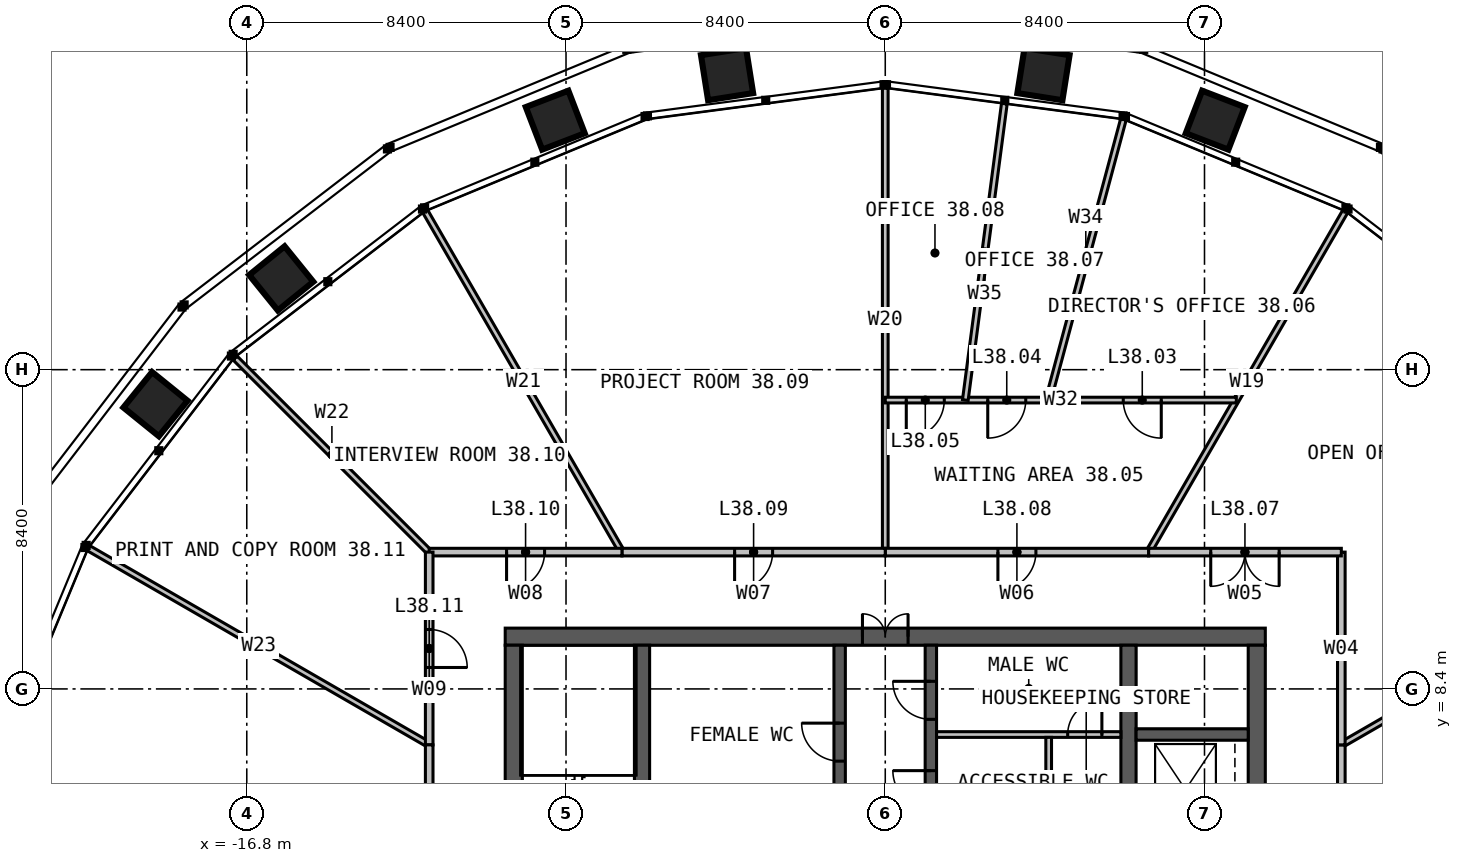
"""IFC4 building model, lengths in metres.
Left out: names, types, materials, properties, quantities, classifications, styles, units other than length and angle.
Written with IfcOpenShell. Run it as: python <this file> out.ifc"""

import sys

from ifc_helpers import new_model, si_unit, direction, frame, frame_2d, origin, place, context, subcontext, project, spatial, rectangle, extrude, element, fill, save


model = new_model("IFC4")
c1 = context("Model", 3, precision=1e-05, world=origin(), true_north=direction((0.0, 1.0)))
c2 = subcontext(c1, "Body", "Model", "MODEL_VIEW")
j1 = project(units=[si_unit("LENGTHUNIT", "METRE"), si_unit("PLANEANGLEUNIT", "RADIAN")], contexts=[c1])
p1 = place(None, origin())
s1 = spatial("IfcSite", under=j1, at=p1, CompositionType="ELEMENT")
p2 = place(p1, origin())
s2 = spatial("IfcBuilding", under=s1, at=p2, CompositionType="ELEMENT")
p3 = place(p2, frame((0.0, 0.0, 159.0)))
s3 = spatial("IfcBuildingStorey", under=s2, at=p3, CompositionType="ELEMENT", Elevation=159.0)
p4 = place(p3, frame((-10.0, 9.775, 0.0), z_axis=(0.0, 0.0, 1.0), x_axis=(1.0, 0.0, 0.0)))
e1 = element("IfcWall", 1, at=p4, inside=s3, PredefinedType="SOLIDWALL", context=c2, shape_type="SweptSolid", body=[
    extrude(rectangle(XDim=20.0, YDim=0.45, at=frame_2d((10.0, 0.0))), origin(), (0.0, 0.0, 1.0), 4.0),
])
p5 = place(p4, frame((9.4, 0.0, 0.0)))
e2 = element("IfcOpeningElement", 2, at=p5, cuts=e1, PredefinedType="OPENING", context=c2, shape_type="SweptSolid", body=[
    extrude(rectangle(XDim=1.2, YDim=2.2, at=frame_2d((0.6, 1.1))), frame((0.0, 0.235, 0.0), z_axis=(0.0, -1.0, 0.0), x_axis=(1.0, 0.0, 0.0)), (0.0, 0.0, 1.0), 0.47),
])
for number, where, z_axis, x_axis in (
    (3, (9.775, -9.55, 0.0), (0.0, 0.0, 1.0), (0.0, 1.0, 0.0)),
    (4, (-9.775, 9.55, 0.0), (0.0, 0.0, 1.0), (0.0, -1.0, 0.0)),
):
    element("IfcWall", number, at=place(p3, frame(where, z_axis=z_axis, x_axis=x_axis)), inside=s3, PredefinedType="SOLIDWALL", context=c2, shape_type="SweptSolid", body=[
        extrude(rectangle(XDim=19.1, YDim=0.45, at=frame_2d((9.55, 0.0))), origin(), (0.0, 0.0, 1.0), 4.0),
    ])
p6 = place(p3, frame((-6.4, -9.55, 0.0), z_axis=(0.0, 0.0, 1.0), x_axis=(0.0, 1.0, 0.0)))
e5 = element("IfcWall", 5, at=p6, inside=s3, PredefinedType="SOLIDWALL", context=c2, shape_type="SweptSolid", body=[
    extrude(rectangle(XDim=19.1, YDim=0.4, at=frame_2d((9.55, 0.0))), origin(), (0.0, 0.0, 1.0), 4.0),
])
p7 = place(p6, frame((9.05, 0.0, 0.0)))
e6 = element("IfcOpeningElement", 6, at=p7, cuts=e5, PredefinedType="OPENING", context=c2, shape_type="SweptSolid", body=[
    extrude(rectangle(XDim=1.0, YDim=2.2, at=frame_2d((0.5, 1.1))), frame((0.0, 0.21, 0.0), z_axis=(0.0, -1.0, 0.0), x_axis=(1.0, 0.0, 0.0)), (0.0, 0.0, 1.0), 0.42),
])
p8 = place(p3, frame((6.4, 9.55, 0.0), z_axis=(0.0, 0.0, 1.0), x_axis=(0.0, -1.0, 0.0)))
e7 = element("IfcWall", 7, at=p8, inside=s3, PredefinedType="SOLIDWALL", context=c2, shape_type="SweptSolid", body=[
    extrude(rectangle(XDim=19.1, YDim=0.4, at=frame_2d((9.55, 0.0))), origin(), (0.0, 0.0, 1.0), 4.0),
])
p9 = place(p8, frame((9.05, 0.0, 0.0)))
e8 = element("IfcOpeningElement", 8, at=p9, cuts=e7, PredefinedType="OPENING", context=c2, shape_type="SweptSolid", body=[
    extrude(rectangle(XDim=1.0, YDim=2.2, at=frame_2d((0.5, 1.1))), frame((0.0, 0.21, 0.0), z_axis=(0.0, -1.0, 0.0), x_axis=(1.0, 0.0, 0.0)), (0.0, 0.0, 1.0), 0.42),
])
p10 = place(p3, frame((-1.2, 1.45, 0.0), z_axis=(0.0, 0.0, 1.0), x_axis=(0.0, 1.0, 0.0)))
e9 = element("IfcWall", 9, at=p10, inside=s3, PredefinedType="SOLIDWALL", context=c2, shape_type="SweptSolid", body=[
    extrude(rectangle(XDim=8.1, YDim=0.3, at=frame_2d((4.05, 0.0))), origin(), (0.0, 0.0, 1.0), 4.0),
])
p11 = place(p10, frame((5.05, 0.0, 0.0)))
e10 = element("IfcOpeningElement", 10, at=p11, cuts=e9, PredefinedType="OPENING", context=c2, shape_type="SweptSolid", body=[
    extrude(rectangle(XDim=1.0, YDim=2.2, at=frame_2d((0.5, 1.1))), frame((0.0, 0.16, 0.0), z_axis=(0.0, -1.0, 0.0), x_axis=(1.0, 0.0, 0.0)), (0.0, 0.0, 1.0), 0.32),
])
p12 = place(p3, frame((1.2, 1.45, 0.0), z_axis=(0.0, 0.0, 1.0), x_axis=(0.0, 1.0, 0.0)))
e11 = element("IfcWall", 11, at=p12, inside=s3, PredefinedType="SOLIDWALL", context=c2, shape_type="SweptSolid", body=[
    extrude(rectangle(XDim=8.1, YDim=0.3, at=frame_2d((4.05, 0.0))), origin(), (0.0, 0.0, 1.0), 4.0),
])
p13 = place(p12, frame((3.8, 0.0, 0.0)))
e12 = element("IfcOpeningElement", 12, at=p13, cuts=e11, PredefinedType="OPENING", context=c2, shape_type="SweptSolid", body=[
    extrude(rectangle(XDim=1.0, YDim=2.2, at=frame_2d((0.5, 1.1))), frame((0.0, 0.16, 0.0), z_axis=(0.0, -1.0, 0.0), x_axis=(1.0, 0.0, 0.0)), (0.0, 0.0, 1.0), 0.32),
])
p14 = place(p12, frame((6.15, 0.0, 0.0)))
e13 = element("IfcOpeningElement", 13, at=p14, cuts=e11, PredefinedType="OPENING", context=c2, shape_type="SweptSolid", body=[
    extrude(rectangle(XDim=1.0, YDim=2.2, at=frame_2d((0.5, 1.1))), frame((0.0, 0.16, 0.0), z_axis=(0.0, -1.0, 0.0), x_axis=(1.0, 0.0, 0.0)), (0.0, 0.0, 1.0), 0.32),
])
p15 = place(p3, frame((6.6, 7.2, 0.0), z_axis=(0.0, 0.0, 1.0), x_axis=(1.0, 0.0, 0.0)))
e14 = element("IfcWall", 14, at=p15, inside=s3, PredefinedType="SOLIDWALL", context=c2, shape_type="SweptSolid", body=[
    extrude(rectangle(XDim=2.95, YDim=0.3, at=frame_2d((1.475, 0.0))), origin(), (0.0, 0.0, 1.0), 4.0),
])
p16 = place(p3, frame((1.35, 7.2, 0.0), z_axis=(0.0, 0.0, 1.0), x_axis=(1.0, 0.0, 0.0)))
e15 = element("IfcWall", 15, at=p16, inside=s3, PredefinedType="PARTITIONING", context=c2, shape_type="SweptSolid", body=[
    extrude(rectangle(XDim=4.85, YDim=0.15, at=frame_2d((2.425, 0.0))), origin(), (0.0, 0.0, 1.0), 3.75),
])
p17 = place(p16, frame((3.45, 0.0, 0.0)))
e16 = element("IfcOpeningElement", 16, at=p17, cuts=e15, PredefinedType="OPENING", context=c2, shape_type="SweptSolid", body=[
    extrude(rectangle(XDim=0.9, YDim=2.2, at=frame_2d((0.45, 1.1))), frame((0.0, 0.085, 0.0), z_axis=(0.0, -1.0, 0.0), x_axis=(1.0, 0.0, 0.0)), (0.0, 0.0, 1.0), 0.17),
])
p18 = place(p3, frame((4.3, 4.75, 0.0), z_axis=(0.0, 0.0, 1.0), x_axis=(0.0, 1.0, 0.0)))
e17 = element("IfcWall", 17, at=p18, inside=s3, PredefinedType="PARTITIONING", context=c2, shape_type="SweptSolid", body=[
    extrude(rectangle(XDim=2.375, YDim=0.15, at=frame_2d((1.188, 0.0))), origin(), (0.0, 0.0, 1.0), 3.75),
])
for number, where, z_axis, x_axis in (
    (18, (12.0, 6.928, 0.0), (0.0, 0.0, 1.0), (0.866, 0.5, 0.0)),
    (19, (6.928, 12.0, 0.0), (0.0, 0.0, 1.0), (0.5, 0.866, 0.0)),
):
    element("IfcWall", number, at=place(p3, frame(where, z_axis=z_axis, x_axis=x_axis)), inside=s3, PredefinedType="PARTITIONING", context=c2, shape_type="SweptSolid", body=[
        extrude(rectangle(XDim=10.355, YDim=0.15, at=frame_2d((5.177, 0.0))), origin(), (0.0, 0.0, 1.0), 2.79),
    ])
p19 = place(p3, frame((0.0, 12.0, 0.0), z_axis=(0.0, 0.0, 1.0), x_axis=(0.0, 1.0, 0.0)))
e20 = element("IfcWall", 20, at=p19, inside=s3, PredefinedType="PARTITIONING", context=c2, shape_type="SweptSolid", body=[
    extrude(rectangle(XDim=12.211, YDim=0.15, at=frame_2d((6.105, 0.0))), origin(), (0.0, 0.0, 1.0), 2.79),
])
p20 = place(p3, frame((-6.928, 12.0, 0.0), z_axis=(0.0, 0.0, 1.0), x_axis=(-0.500006140648, 0.86602185845, 0.0)))
e21 = element("IfcWall", 21, at=p20, inside=s3, PredefinedType="PARTITIONING", context=c2, shape_type="SweptSolid", body=[
    extrude(rectangle(XDim=10.355, YDim=0.15, at=frame_2d((5.177, 0.0))), origin(), (0.0, 0.0, 1.0), 2.79),
])
p21 = place(p3, frame((-12.0, 12.0, 0.0), z_axis=(0.0, 0.0, 1.0), x_axis=(-0.707106781187, 0.707106781187, 0.0)))
e22 = element("IfcWall", 22, at=p21, inside=s3, PredefinedType="PARTITIONING", context=c2, shape_type="SweptSolid", body=[
    extrude(rectangle(XDim=7.24, YDim=0.15, at=frame_2d((3.62, 0.0))), origin(), (0.0, 0.0, 1.0), 2.79),
])
p22 = place(p3, frame((-12.0, 6.928, 0.0), z_axis=(0.0, 0.0, 1.0), x_axis=(-0.86602185845, 0.500006140648, 0.0)))
e23 = element("IfcWall", 23, at=p22, inside=s3, PredefinedType="PARTITIONING", context=c2, shape_type="SweptSolid", body=[
    extrude(rectangle(XDim=10.355, YDim=0.15, at=frame_2d((5.177, 0.0))), origin(), (0.0, 0.0, 1.0), 2.79),
])
p23 = place(p3, frame((12.0, -6.928, 0.0), z_axis=(0.0, 0.0, 1.0), x_axis=(0.0, 1.0, 0.0)))
e24 = element("IfcWall", 24, at=p23, inside=s3, PredefinedType="PARTITIONING", context=c2, shape_type="SweptSolid", body=[
    extrude(rectangle(XDim=13.856, YDim=0.2, at=frame_2d((6.928, 0.0))), origin(), (0.0, 0.0, 1.0), 3.8),
])
p24 = place(p23, frame((6.028, 0.0, 0.0)))
e25 = element("IfcOpeningElement", 25, at=p24, cuts=e24, PredefinedType="OPENING", context=c2, shape_type="SweptSolid", body=[
    extrude(rectangle(XDim=1.8, YDim=2.2, at=frame_2d((0.9, 1.1))), frame((0.0, 0.11, 0.0), z_axis=(0.0, -1.0, 0.0), x_axis=(1.0, 0.0, 0.0)), (0.0, 0.0, 1.0), 0.22),
])
p25 = place(p3, frame((12.0, 6.928, 0.0), z_axis=(0.0, 0.0, 1.0), x_axis=(0.0, 1.0, 0.0)))
e26 = element("IfcWall", 26, at=p25, inside=s3, PredefinedType="PARTITIONING", context=c2, shape_type="SweptSolid", body=[
    extrude(rectangle(XDim=5.072, YDim=0.2, at=frame_2d((2.536, 0.0))), origin(), (0.0, 0.0, 1.0), 3.8),
])
p26 = place(p3, frame((12.0, 12.0, 0.0), z_axis=(0.0, 0.0, 1.0), x_axis=(-1.0, 0.0, 0.0)))
e27 = element("IfcWall", 27, at=p26, inside=s3, PredefinedType="PARTITIONING", context=c2, shape_type="SweptSolid", body=[
    extrude(rectangle(XDim=5.072, YDim=0.2, at=frame_2d((2.536, 0.0))), origin(), (0.0, 0.0, 1.0), 3.8),
])
p27 = place(p26, frame((1.636, 0.0, 0.0)))
e28 = element("IfcOpeningElement", 28, at=p27, cuts=e27, PredefinedType="OPENING", context=c2, shape_type="SweptSolid", body=[
    extrude(rectangle(XDim=1.8, YDim=2.2, at=frame_2d((0.9, 1.1))), frame((0.0, 0.11, 0.0), z_axis=(0.0, -1.0, 0.0), x_axis=(1.0, 0.0, 0.0)), (0.0, 0.0, 1.0), 0.22),
])
p28 = place(p3, frame((9.238, 16.0, 0.0), z_axis=(0.0, 0.0, 1.0), x_axis=(-1.0, 0.0, 0.0)))
e29 = element("IfcWall", 29, at=p28, inside=s3, PredefinedType="PARTITIONING", context=c2, shape_type="SweptSolid", body=[
    extrude(rectangle(XDim=9.238, YDim=0.15, at=frame_2d((4.619, 0.0))), origin(), (0.0, 0.0, 1.0), 2.79),
])
p29 = place(p28, frame((1.975, 0.0, 0.0)))
e30 = element("IfcOpeningElement", 30, at=p29, cuts=e29, PredefinedType="OPENING", context=c2, shape_type="SweptSolid", body=[
    extrude(rectangle(XDim=1.0, YDim=2.2, at=frame_2d((0.5, 1.1))), frame((0.0, 0.085, 0.0), z_axis=(0.0, -1.0, 0.0), x_axis=(1.0, 0.0, 0.0)), (0.0, 0.0, 1.0), 0.17),
])
p30 = place(p28, frame((5.541, 0.0, 0.0)))
e31 = element("IfcOpeningElement", 31, at=p30, cuts=e29, PredefinedType="OPENING", context=c2, shape_type="SweptSolid", body=[
    extrude(rectangle(XDim=1.0, YDim=2.2, at=frame_2d((0.5, 1.1))), frame((0.0, 0.085, 0.0), z_axis=(0.0, -1.0, 0.0), x_axis=(1.0, 0.0, 0.0)), (0.0, 0.0, 1.0), 0.17),
])
p31 = place(p28, frame((7.684, 0.0, 0.0)))
e32 = element("IfcOpeningElement", 32, at=p31, cuts=e29, PredefinedType="OPENING", context=c2, shape_type="SweptSolid", body=[
    extrude(rectangle(XDim=1.0, YDim=2.2, at=frame_2d((0.5, 1.1))), frame((0.0, 0.085, 0.0), z_axis=(0.0, -1.0, 0.0), x_axis=(1.0, 0.0, 0.0)), (0.0, 0.0, 1.0), 0.17),
])
p32 = place(p3, frame((4.287, 16.0, 0.0), z_axis=(0.0, 0.0, 1.0), x_axis=(0.25883290061, 0.965922113611, 0.0)))
e33 = element("IfcWall", 33, at=p32, inside=s3, PredefinedType="PARTITIONING", context=c2, shape_type="SweptSolid", body=[
    extrude(rectangle(XDim=7.647, YDim=0.15, at=frame_2d((3.823, 0.0))), origin(), (0.0, 0.0, 1.0), 2.79),
])
p33 = place(p3, frame((2.106, 16.0, 0.0), z_axis=(0.0, 0.0, 1.0), x_axis=(0.130510712839, 0.99144689915, 0.0)))
e34 = element("IfcWall", 34, at=p33, inside=s3, PredefinedType="PARTITIONING", context=c2, shape_type="SweptSolid", body=[
    extrude(rectangle(XDim=7.866, YDim=0.15, at=frame_2d((3.933, 0.0))), origin(), (0.0, 0.0, 1.0), 2.79),
])
p34 = place(p3, frame((6.928, 12.0, 0.0), z_axis=(0.0, 0.0, 1.0), x_axis=(-1.0, 0.0, 0.0)))
e35 = element("IfcWall", 35, at=p34, inside=s3, PredefinedType="PARTITIONING", context=c2, shape_type="SweptSolid", body=[
    extrude(rectangle(XDim=6.928, YDim=0.2, at=frame_2d((3.464, 0.0))), origin(), (0.0, 0.0, 1.0), 3.8),
])
p35 = place(p34, frame((2.964, 0.0, 0.0)))
e36 = element("IfcOpeningElement", 36, at=p35, cuts=e35, PredefinedType="OPENING", context=c2, shape_type="SweptSolid", body=[
    extrude(rectangle(XDim=1.0, YDim=2.2, at=frame_2d((0.5, 1.1))), frame((0.0, 0.11, 0.0), z_axis=(0.0, -1.0, 0.0), x_axis=(1.0, 0.0, 0.0)), (0.0, 0.0, 1.0), 0.22),
])
p36 = place(p3, frame((0.0, 12.0, 0.0), z_axis=(0.0, 0.0, 1.0), x_axis=(-1.0, 0.0, 0.0)))
e37 = element("IfcWall", 37, at=p36, inside=s3, PredefinedType="PARTITIONING", context=c2, shape_type="SweptSolid", body=[
    extrude(rectangle(XDim=6.928, YDim=0.2, at=frame_2d((3.464, 0.0))), origin(), (0.0, 0.0, 1.0), 3.8),
])
p37 = place(p36, frame((2.964, 0.0, 0.0)))
e38 = element("IfcOpeningElement", 38, at=p37, cuts=e37, PredefinedType="OPENING", context=c2, shape_type="SweptSolid", body=[
    extrude(rectangle(XDim=1.0, YDim=2.2, at=frame_2d((0.5, 1.1))), frame((0.0, 0.11, 0.0), z_axis=(0.0, -1.0, 0.0), x_axis=(1.0, 0.0, 0.0)), (0.0, 0.0, 1.0), 0.22),
])
p38 = place(p3, frame((-6.928, 12.0, 0.0), z_axis=(0.0, 0.0, 1.0), x_axis=(-1.0, 0.0, 0.0)))
e39 = element("IfcWall", 39, at=p38, inside=s3, PredefinedType="PARTITIONING", context=c2, shape_type="SweptSolid", body=[
    extrude(rectangle(XDim=5.072, YDim=0.2, at=frame_2d((2.536, 0.0))), origin(), (0.0, 0.0, 1.0), 3.8),
])
p39 = place(p38, frame((2.036, 0.0, 0.0)))
e40 = element("IfcOpeningElement", 40, at=p39, cuts=e39, PredefinedType="OPENING", context=c2, shape_type="SweptSolid", body=[
    extrude(rectangle(XDim=1.0, YDim=2.2, at=frame_2d((0.5, 1.1))), frame((0.0, 0.11, 0.0), z_axis=(0.0, -1.0, 0.0), x_axis=(1.0, 0.0, 0.0)), (0.0, 0.0, 1.0), 0.22),
])
p40 = place(p3, frame((-12.0, 12.0, 0.0), z_axis=(0.0, 0.0, 1.0), x_axis=(0.0, -1.0, 0.0)))
e41 = element("IfcWall", 41, at=p40, inside=s3, PredefinedType="PARTITIONING", context=c2, shape_type="SweptSolid", body=[
    extrude(rectangle(XDim=5.072, YDim=0.2, at=frame_2d((2.536, 0.0))), origin(), (0.0, 0.0, 1.0), 3.8),
])
p41 = place(p40, frame((2.036, 0.0, 0.0)))
e42 = element("IfcOpeningElement", 42, at=p41, cuts=e41, PredefinedType="OPENING", context=c2, shape_type="SweptSolid", body=[
    extrude(rectangle(XDim=1.0, YDim=2.2, at=frame_2d((0.5, 1.1))), frame((0.0, 0.11, 0.0), z_axis=(0.0, -1.0, 0.0), x_axis=(1.0, 0.0, 0.0)), (0.0, 0.0, 1.0), 0.22),
])
p42 = place(p3, frame((-12.0, 6.928, 0.0), z_axis=(0.0, 0.0, 1.0), x_axis=(0.0, -1.0, 0.0)))
e43 = element("IfcWall", 43, at=p42, inside=s3, PredefinedType="PARTITIONING", context=c2, shape_type="SweptSolid", body=[
    extrude(rectangle(XDim=8.508, YDim=0.2, at=frame_2d((4.254, 0.0))), origin(), (0.0, 0.0, 1.0), 3.8),
])
p43 = place(p42, frame((3.354, 0.0, 0.0)))
e44 = element("IfcOpeningElement", 44, at=p43, cuts=e43, PredefinedType="OPENING", context=c2, shape_type="SweptSolid", body=[
    extrude(rectangle(XDim=1.8, YDim=2.2, at=frame_2d((0.9, 1.1))), frame((0.0, 0.11, 0.0), z_axis=(0.0, -1.0, 0.0), x_axis=(1.0, 0.0, 0.0)), (0.0, 0.0, 1.0), 0.22),
])
p44 = place(p5, origin())
e45 = element("IfcDoor", 45, at=p44, inside=s3, OperationType="DOUBLE_DOOR_SINGLE_SWING", PredefinedType="DOOR", context=c2, shape_type="SweptSolid", body=[
    extrude(rectangle(XDim=1.2, YDim=2.2, at=frame_2d((0.6, 1.1))), frame((0.0, 0.025, 0.0), z_axis=(0.0, -1.0, 0.0), x_axis=(1.0, 0.0, 0.0)), (0.0, 0.0, 1.0), 0.05),
])
fill(e2, e45)
p45 = place(p11, origin())
e46 = element("IfcDoor", 46, at=p45, inside=s3, OperationType="SINGLE_SWING_RIGHT", PredefinedType="DOOR", context=c2, shape_type="SweptSolid", body=[
    extrude(rectangle(XDim=1.0, YDim=2.2, at=frame_2d((0.5, 1.1))), frame((0.0, 0.025, 0.0), z_axis=(0.0, -1.0, 0.0), x_axis=(1.0, 0.0, 0.0)), (0.0, 0.0, 1.0), 0.05),
])
fill(e10, e46)
p46 = place(p13, origin())
e47 = element("IfcDoor", 47, at=p46, inside=s3, OperationType="SINGLE_SWING_RIGHT", PredefinedType="DOOR", context=c2, shape_type="SweptSolid", body=[
    extrude(rectangle(XDim=1.0, YDim=2.2, at=frame_2d((0.5, 1.1))), frame((0.0, 0.025, 0.0), z_axis=(0.0, -1.0, 0.0), x_axis=(1.0, 0.0, 0.0)), (0.0, 0.0, 1.0), 0.05),
])
fill(e12, e47)
p47 = place(p14, origin())
e48 = element("IfcDoor", 48, at=p47, inside=s3, OperationType="SINGLE_SWING_RIGHT", PredefinedType="DOOR", context=c2, shape_type="SweptSolid", body=[
    extrude(rectangle(XDim=1.0, YDim=2.2, at=frame_2d((0.5, 1.1))), frame((0.0, 0.025, 0.0), z_axis=(0.0, -1.0, 0.0), x_axis=(1.0, 0.0, 0.0)), (0.0, 0.0, 1.0), 0.05),
])
fill(e13, e48)
p48 = place(p17, origin())
e49 = element("IfcDoor", 49, at=p48, inside=s3, OperationType="SINGLE_SWING_RIGHT", PredefinedType="DOOR", context=c2, shape_type="SweptSolid", body=[
    extrude(rectangle(XDim=0.9, YDim=2.2, at=frame_2d((0.45, 1.1))), frame((0.0, 0.025, 0.0), z_axis=(0.0, -1.0, 0.0), x_axis=(1.0, 0.0, 0.0)), (0.0, 0.0, 1.0), 0.05),
])
fill(e16, e49)
p49 = place(p27, origin())
e50 = element("IfcDoor", 50, at=p49, inside=s3, OperationType="DOUBLE_DOOR_SINGLE_SWING", PredefinedType="DOOR", context=c2, shape_type="SweptSolid", body=[
    extrude(rectangle(XDim=1.8, YDim=2.2, at=frame_2d((0.9, 1.1))), frame((0.0, 0.025, 0.0), z_axis=(0.0, -1.0, 0.0), x_axis=(1.0, 0.0, 0.0)), (0.0, 0.0, 1.0), 0.05),
])
fill(e28, e50)
p50 = place(p29, origin())
e51 = element("IfcDoor", 51, at=p50, inside=s3, OperationType="SINGLE_SWING_LEFT", PredefinedType="DOOR", context=c2, shape_type="SweptSolid", body=[
    extrude(rectangle(XDim=1.0, YDim=2.2, at=frame_2d((0.5, 1.1))), frame((0.0, 0.025, 0.0), z_axis=(0.0, -1.0, 0.0), x_axis=(1.0, 0.0, 0.0)), (0.0, 0.0, 1.0), 0.05),
])
fill(e30, e51)
p51 = place(p30, origin())
e52 = element("IfcDoor", 52, at=p51, inside=s3, OperationType="SINGLE_SWING_RIGHT", PredefinedType="DOOR", context=c2, shape_type="SweptSolid", body=[
    extrude(rectangle(XDim=1.0, YDim=2.2, at=frame_2d((0.5, 1.1))), frame((0.0, 0.025, 0.0), z_axis=(0.0, -1.0, 0.0), x_axis=(1.0, 0.0, 0.0)), (0.0, 0.0, 1.0), 0.05),
])
fill(e31, e52)
p52 = place(p31, origin())
e53 = element("IfcDoor", 53, at=p52, inside=s3, OperationType="SINGLE_SWING_RIGHT", PredefinedType="DOOR", context=c2, shape_type="SweptSolid", body=[
    extrude(rectangle(XDim=1.0, YDim=2.2, at=frame_2d((0.5, 1.1))), frame((0.0, 0.025, 0.0), z_axis=(0.0, -1.0, 0.0), x_axis=(1.0, 0.0, 0.0)), (0.0, 0.0, 1.0), 0.05),
])
fill(e32, e53)
p53 = place(p35, origin())
e54 = element("IfcDoor", 54, at=p53, inside=s3, OperationType="SINGLE_SWING_RIGHT", PredefinedType="DOOR", context=c2, shape_type="SweptSolid", body=[
    extrude(rectangle(XDim=1.0, YDim=2.2, at=frame_2d((0.5, 1.1))), frame((0.0, 0.025, 0.0), z_axis=(0.0, -1.0, 0.0), x_axis=(1.0, 0.0, 0.0)), (0.0, 0.0, 1.0), 0.05),
])
fill(e36, e54)
p54 = place(p37, origin())
e55 = element("IfcDoor", 55, at=p54, inside=s3, OperationType="SINGLE_SWING_RIGHT", PredefinedType="DOOR", context=c2, shape_type="SweptSolid", body=[
    extrude(rectangle(XDim=1.0, YDim=2.2, at=frame_2d((0.5, 1.1))), frame((0.0, 0.025, 0.0), z_axis=(0.0, -1.0, 0.0), x_axis=(1.0, 0.0, 0.0)), (0.0, 0.0, 1.0), 0.05),
])
fill(e38, e55)
p55 = place(p39, origin())
e56 = element("IfcDoor", 56, at=p55, inside=s3, OperationType="SINGLE_SWING_RIGHT", PredefinedType="DOOR", context=c2, shape_type="SweptSolid", body=[
    extrude(rectangle(XDim=1.0, YDim=2.2, at=frame_2d((0.5, 1.1))), frame((0.0, 0.025, 0.0), z_axis=(0.0, -1.0, 0.0), x_axis=(1.0, 0.0, 0.0)), (0.0, 0.0, 1.0), 0.05),
])
fill(e40, e56)
p56 = place(p41, origin())
e57 = element("IfcDoor", 57, at=p56, inside=s3, OperationType="SINGLE_SWING_RIGHT", PredefinedType="DOOR", context=c2, shape_type="SweptSolid", body=[
    extrude(rectangle(XDim=1.0, YDim=2.2, at=frame_2d((0.5, 1.1))), frame((0.0, 0.025, 0.0), z_axis=(0.0, -1.0, 0.0), x_axis=(1.0, 0.0, 0.0)), (0.0, 0.0, 1.0), 0.05),
])
fill(e42, e57)
save(model, sys.argv[1])
